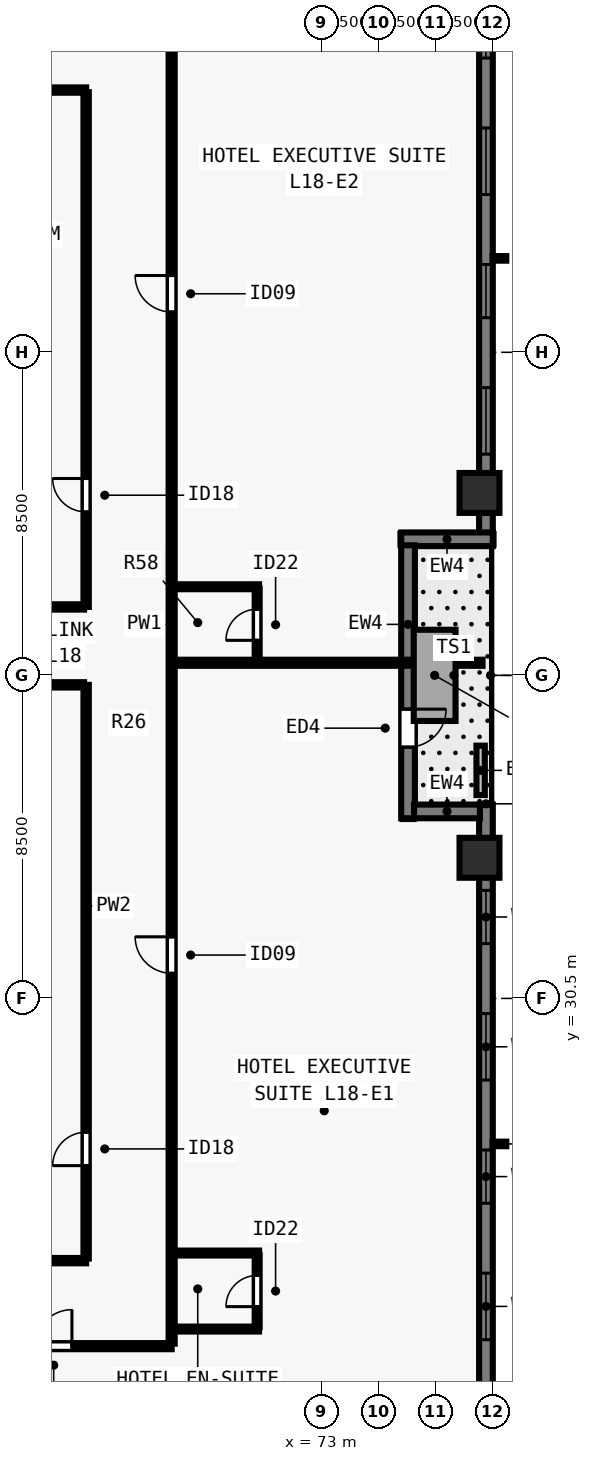
"""IFC4 building model, lengths in metres.
Left out: names, types, materials, properties, quantities, classifications, styles, units other than length and angle.
Written with IfcOpenShell. Run it as: python <this file> out.ifc"""

import sys

from ifc_helpers import new_model, si_unit, direction, frame, frame_2d, origin, origin_2d, place, context, subcontext, project, spatial, rectangle, extrude, element, fill, save


model = new_model("IFC4")
c1 = context("Model", 3, precision=1e-05, world=origin(), true_north=direction((0.0, 1.0)))
c2 = subcontext(c1, "Body", "Model", "MODEL_VIEW")
j1 = project(units=[si_unit("LENGTHUNIT", "METRE"), si_unit("PLANEANGLEUNIT", "RADIAN")], contexts=[c1])
p1 = place(None, origin())
s1 = spatial("IfcSite", under=j1, at=p1, CompositionType="ELEMENT")
p2 = place(p1, origin())
s2 = spatial("IfcBuilding", under=s1, at=p2, CompositionType="ELEMENT")
p3 = place(p2, frame((0.0, 0.0, 69.0)))
s3 = spatial("IfcBuildingStorey", under=s2, at=p3, CompositionType="ELEMENT", Elevation=69.0)
for number, where, z_axis, x_axis in (
    (1, (77.15, 34.2, 0.0), (0.0, 0.0, 1.0), (0.0, 1.0, 0.0)),
    (2, (77.15, 43.8, 0.0), (0.0, 0.0, 1.0), (0.0, 1.0, 0.0)),
):
    element("IfcColumn", number, at=place(p3, frame(where, z_axis=z_axis, x_axis=x_axis)), inside=s3, PredefinedType="COLUMN", context=c2, shape_type="SweptSolid", body=[
        extrude(rectangle(XDim=1.05, YDim=1.05, at=origin_2d()), origin(), (0.0, 0.0, 1.0), 3.5),
    ])
p4 = place(p3, frame((77.32, 35.6, 0.0), z_axis=(0.0, 0.0, 1.0), x_axis=(0.0, -1.0, 0.0)))
e3 = element("IfcWall", 3, at=p4, inside=s3, PredefinedType="SOLIDWALL", context=c2, shape_type="SweptSolid", body=[
    extrude(rectangle(XDim=18.762, YDim=0.36, at=frame_2d((9.381, 0.0))), origin(), (0.0, 0.0, 1.0), 3.28),
])
p5 = place(p4, frame((2.258, 0.0, 0.8)))
e4 = element("IfcOpeningElement", 4, at=p5, cuts=e3, PredefinedType="OPENING", context=c2, shape_type="SweptSolid", body=[
    extrude(rectangle(XDim=1.4, YDim=1.544, at=frame_2d((0.7, 0.772))), frame((0.0, 0.19, 0.0), z_axis=(0.0, -1.0, 0.0), x_axis=(1.0, 0.0, 0.0)), (0.0, 0.0, 1.0), 0.38),
])
p6 = place(p4, frame((5.498, 0.0, 0.8)))
e5 = element("IfcOpeningElement", 5, at=p6, cuts=e3, PredefinedType="OPENING", context=c2, shape_type="SweptSolid", body=[
    extrude(rectangle(XDim=1.75, YDim=1.544, at=frame_2d((0.875, 0.772))), frame((0.0, 0.19, 0.0), z_axis=(0.0, -1.0, 0.0), x_axis=(1.0, 0.0, 0.0)), (0.0, 0.0, 1.0), 0.38),
])
p7 = place(p4, frame((9.089, 0.0, 0.8)))
e6 = element("IfcOpeningElement", 6, at=p7, cuts=e3, PredefinedType="OPENING", context=c2, shape_type="SweptSolid", body=[
    extrude(rectangle(XDim=1.4, YDim=1.544, at=frame_2d((0.7, 0.772))), frame((0.0, 0.19, 0.0), z_axis=(0.0, -1.0, 0.0), x_axis=(1.0, 0.0, 0.0)), (0.0, 0.0, 1.0), 0.38),
])
p8 = place(p4, frame((12.329, 0.0, 0.8)))
e7 = element("IfcOpeningElement", 7, at=p8, cuts=e3, PredefinedType="OPENING", context=c2, shape_type="SweptSolid", body=[
    extrude(rectangle(XDim=1.75, YDim=1.544, at=frame_2d((0.875, 0.772))), frame((0.0, 0.19, 0.0), z_axis=(0.0, -1.0, 0.0), x_axis=(1.0, 0.0, 0.0)), (0.0, 0.0, 1.0), 0.38),
])
p9 = place(p3, frame((77.32, 61.5, 0.0), z_axis=(0.0, 0.0, 1.0), x_axis=(0.0, -1.0, 0.0)))
e8 = element("IfcWall", 8, at=p9, inside=s3, PredefinedType="SOLIDWALL", context=c2, shape_type="SweptSolid", body=[
    extrude(rectangle(XDim=18.762, YDim=0.36, at=frame_2d((9.381, 0.0))), origin(), (0.0, 0.0, 1.0), 3.28),
])
p10 = place(p9, frame((4.858, 0.0, 0.8)))
e9 = element("IfcOpeningElement", 9, at=p10, cuts=e8, PredefinedType="OPENING", context=c2, shape_type="SweptSolid", body=[
    extrude(rectangle(XDim=1.4, YDim=1.544, at=frame_2d((0.7, 0.772))), frame((0.0, 0.19, 0.0), z_axis=(0.0, -1.0, 0.0), x_axis=(1.0, 0.0, 0.0)), (0.0, 0.0, 1.0), 0.38),
])
p11 = place(p9, frame((8.098, 0.0, 0.8)))
e10 = element("IfcOpeningElement", 10, at=p11, cuts=e8, PredefinedType="OPENING", context=c2, shape_type="SweptSolid", body=[
    extrude(rectangle(XDim=1.75, YDim=1.544, at=frame_2d((0.875, 0.772))), frame((0.0, 0.19, 0.0), z_axis=(0.0, -1.0, 0.0), x_axis=(1.0, 0.0, 0.0)), (0.0, 0.0, 1.0), 0.38),
])
p12 = place(p9, frame((11.689, 0.0, 0.8)))
e11 = element("IfcOpeningElement", 11, at=p12, cuts=e8, PredefinedType="OPENING", context=c2, shape_type="SweptSolid", body=[
    extrude(rectangle(XDim=1.4, YDim=1.544, at=frame_2d((0.7, 0.772))), frame((0.0, 0.19, 0.0), z_axis=(0.0, -1.0, 0.0), x_axis=(1.0, 0.0, 0.0)), (0.0, 0.0, 1.0), 0.38),
])
p13 = place(p9, frame((14.929, 0.0, 0.8)))
e12 = element("IfcOpeningElement", 12, at=p13, cuts=e8, PredefinedType="OPENING", context=c2, shape_type="SweptSolid", body=[
    extrude(rectangle(XDim=1.75, YDim=1.544, at=frame_2d((0.875, 0.772))), frame((0.0, 0.19, 0.0), z_axis=(0.0, -1.0, 0.0), x_axis=(1.0, 0.0, 0.0)), (0.0, 0.0, 1.0), 0.38),
])
p14 = place(p3, frame((77.5, 42.58, 0.0), z_axis=(0.0, 0.0, 1.0), x_axis=(-1.0, 0.0, 0.0)))
e13 = element("IfcWall", 13, at=p14, inside=s3, PredefinedType="SOLIDWALL", context=c2, shape_type="SweptSolid", body=[
    extrude(rectangle(XDim=2.41, YDim=0.36, at=frame_2d((1.205, 0.0))), origin(), (0.0, 0.0, 1.0), 3.28),
])
p15 = place(p3, frame((75.27, 42.422, 0.0), z_axis=(0.0, 0.0, 1.0), x_axis=(0.0, -1.0, 0.0)))
e14 = element("IfcWall", 14, at=p15, inside=s3, PredefinedType="SOLIDWALL", context=c2, shape_type="SweptSolid", body=[
    extrude(rectangle(XDim=7.182, YDim=0.36, at=frame_2d((3.591, 0.0))), origin(), (0.0, 0.0, 1.0), 3.28),
])
p16 = place(p15, frame((4.311, 0.0, 0.0)))
e15 = element("IfcOpeningElement", 15, at=p16, cuts=e14, PredefinedType="OPENING", context=c2, shape_type="SweptSolid", body=[
    extrude(rectangle(XDim=1.0, YDim=2.15, at=frame_2d((0.5, 1.075))), frame((0.0, 0.19, 0.0), z_axis=(0.0, -1.0, 0.0), x_axis=(1.0, 0.0, 0.0)), (0.0, 0.0, 1.0), 0.38),
])
p17 = place(p3, frame((75.428, 35.42, 0.0), z_axis=(0.0, 0.0, 1.0), x_axis=(1.0, 0.0, 0.0)))
e16 = element("IfcWall", 16, at=p17, inside=s3, PredefinedType="SOLIDWALL", context=c2, shape_type="SweptSolid", body=[
    extrude(rectangle(XDim=1.734, YDim=0.36, at=frame_2d((0.867, 0.0))), origin(), (0.0, 0.0, 1.0), 3.28),
])
p18 = place(p3, frame((77.18, 35.85, 0.0), z_axis=(0.0, 0.0, 1.0), x_axis=(0.0, 1.0, 0.0)))
e17 = element("IfcWall", 17, at=p18, inside=s3, PredefinedType="PARAPET", context=c2, shape_type="SweptSolid", body=[
    extrude(rectangle(XDim=1.3, YDim=0.22, at=frame_2d((0.65, 0.0))), origin(), (0.0, 0.0, 1.0), 0.55),
])
p19 = place(p3, frame((34.95, 21.35, 0.0), z_axis=(0.0, 0.0, 1.0), x_axis=(1.0, 0.0, 0.0)))
e18 = element("IfcWall", 18, at=p19, inside=s3, PredefinedType="PARTITIONING", context=c2, shape_type="SweptSolid", body=[
    extrude(rectangle(XDim=34.1, YDim=0.16, at=frame_2d((17.05, 0.0))), origin(), (0.0, 0.0, 1.0), 3.28),
])
p20 = place(p19, frame((3.614, 0.0, 0.0)))
e19 = element("IfcOpeningElement", 19, at=p20, cuts=e18, PredefinedType="OPENING", context=c2, shape_type="SweptSolid", body=[
    extrude(rectangle(XDim=0.96, YDim=2.15, at=frame_2d((0.48, 1.075))), frame((0.0, 0.09, 0.0), z_axis=(0.0, -1.0, 0.0), x_axis=(1.0, 0.0, 0.0)), (0.0, 0.0, 1.0), 0.18),
])
p21 = place(p19, frame((17.56, 0.0, 0.0)))
e20 = element("IfcOpeningElement", 20, at=p21, cuts=e18, PredefinedType="OPENING", context=c2, shape_type="SweptSolid", body=[
    extrude(rectangle(XDim=0.96, YDim=2.15, at=frame_2d((0.48, 1.075))), frame((0.0, 0.09, 0.0), z_axis=(0.0, -1.0, 0.0), x_axis=(1.0, 0.0, 0.0)), (0.0, 0.0, 1.0), 0.18),
])
p22 = place(p19, frame((30.516, 0.0, 0.0)))
e21 = element("IfcOpeningElement", 21, at=p22, cuts=e18, PredefinedType="OPENING", context=c2, shape_type="SweptSolid", body=[
    extrude(rectangle(XDim=0.96, YDim=2.15, at=frame_2d((0.48, 1.075))), frame((0.0, 0.09, 0.0), z_axis=(0.0, -1.0, 0.0), x_axis=(1.0, 0.0, 0.0)), (0.0, 0.0, 1.0), 0.18),
])
p23 = place(p3, frame((69.05, 21.415, 0.0), z_axis=(0.0, 0.0, 1.0), x_axis=(0.0, 1.0, 0.0)))
e22 = element("IfcWall", 22, at=p23, inside=s3, PredefinedType="PARTITIONING", context=c2, shape_type="SweptSolid", body=[
    extrude(rectangle(XDim=35.17, YDim=0.16, at=frame_2d((17.585, 0.0))), origin(), (0.0, 0.0, 1.0), 3.28),
])
p24 = place(p23, frame((9.746, 0.0, 0.0)))
e23 = element("IfcOpeningElement", 23, at=p24, cuts=e22, PredefinedType="OPENING", context=c2, shape_type="SweptSolid", body=[
    extrude(rectangle(XDim=0.96, YDim=2.15, at=frame_2d((0.48, 1.075))), frame((0.0, 0.09, 0.0), z_axis=(0.0, -1.0, 0.0), x_axis=(1.0, 0.0, 0.0)), (0.0, 0.0, 1.0), 0.18),
])
p25 = place(p23, frame((27.146, 0.0, 0.0)))
e24 = element("IfcOpeningElement", 24, at=p25, cuts=e22, PredefinedType="OPENING", context=c2, shape_type="SweptSolid", body=[
    extrude(rectangle(XDim=0.96, YDim=2.15, at=frame_2d((0.48, 1.075))), frame((0.0, 0.09, 0.0), z_axis=(0.0, -1.0, 0.0), x_axis=(1.0, 0.0, 0.0)), (0.0, 0.0, 1.0), 0.18),
])
p26 = place(p3, frame((37.2, 23.6, 0.0), z_axis=(0.0, 0.0, 1.0), x_axis=(1.0, 0.0, 0.0)))
e25 = element("IfcWall", 25, at=p26, inside=s3, PredefinedType="PARTITIONING", context=c2, shape_type="SweptSolid", body=[
    extrude(rectangle(XDim=29.6, YDim=0.14, at=frame_2d((14.8, 0.0))), origin(), (0.0, 0.0, 1.0), 3.28),
])
p27 = place(p26, frame((1.2, 0.0, 0.0)))
e26 = element("IfcOpeningElement", 26, at=p27, cuts=e25, PredefinedType="OPENING", context=c2, shape_type="SweptSolid", body=[
    extrude(rectangle(XDim=0.88, YDim=2.1, at=frame_2d((0.44, 1.05))), frame((0.0, 0.08, 0.0), z_axis=(0.0, -1.0, 0.0), x_axis=(1.0, 0.0, 0.0)), (0.0, 0.0, 1.0), 0.16),
])
p28 = place(p26, frame((11.3, 0.0, 0.0)))
e27 = element("IfcOpeningElement", 27, at=p28, cuts=e25, PredefinedType="OPENING", context=c2, shape_type="SweptSolid", body=[
    extrude(rectangle(XDim=0.88, YDim=2.1, at=frame_2d((0.44, 1.05))), frame((0.0, 0.08, 0.0), z_axis=(0.0, -1.0, 0.0), x_axis=(1.0, 0.0, 0.0)), (0.0, 0.0, 1.0), 0.16),
])
p29 = place(p26, frame((21.8, 0.0, 0.0)))
e28 = element("IfcOpeningElement", 28, at=p29, cuts=e25, PredefinedType="OPENING", context=c2, shape_type="SweptSolid", body=[
    extrude(rectangle(XDim=0.88, YDim=2.1, at=frame_2d((0.44, 1.05))), frame((0.0, 0.08, 0.0), z_axis=(0.0, -1.0, 0.0), x_axis=(1.0, 0.0, 0.0)), (0.0, 0.0, 1.0), 0.16),
])
p30 = place(p3, frame((37.2, 54.4, 0.0), z_axis=(0.0, 0.0, 1.0), x_axis=(1.0, 0.0, 0.0)))
e29 = element("IfcWall", 29, at=p30, inside=s3, PredefinedType="PARTITIONING", context=c2, shape_type="SweptSolid", body=[
    extrude(rectangle(XDim=29.6, YDim=0.14, at=frame_2d((14.8, 0.0))), origin(), (0.0, 0.0, 1.0), 3.28),
])
p31 = place(p30, frame((2.2, 0.0, 0.0)))
e30 = element("IfcOpeningElement", 30, at=p31, cuts=e29, PredefinedType="OPENING", context=c2, shape_type="SweptSolid", body=[
    extrude(rectangle(XDim=0.88, YDim=2.1, at=frame_2d((0.44, 1.05))), frame((0.0, 0.08, 0.0), z_axis=(0.0, -1.0, 0.0), x_axis=(1.0, 0.0, 0.0)), (0.0, 0.0, 1.0), 0.16),
])
p32 = place(p30, frame((15.3, 0.0, 0.0)))
e31 = element("IfcOpeningElement", 31, at=p32, cuts=e29, PredefinedType="OPENING", context=c2, shape_type="SweptSolid", body=[
    extrude(rectangle(XDim=0.88, YDim=2.1, at=frame_2d((0.44, 1.05))), frame((0.0, 0.08, 0.0), z_axis=(0.0, -1.0, 0.0), x_axis=(1.0, 0.0, 0.0)), (0.0, 0.0, 1.0), 0.16),
])
p33 = place(p30, frame((24.8, 0.0, 0.0)))
e32 = element("IfcOpeningElement", 32, at=p33, cuts=e29, PredefinedType="OPENING", context=c2, shape_type="SweptSolid", body=[
    extrude(rectangle(XDim=0.88, YDim=2.1, at=frame_2d((0.44, 1.05))), frame((0.0, 0.08, 0.0), z_axis=(0.0, -1.0, 0.0), x_axis=(1.0, 0.0, 0.0)), (0.0, 0.0, 1.0), 0.16),
])
p34 = place(p3, frame((66.8, 23.655, 0.0), z_axis=(0.0, 0.0, 1.0), x_axis=(0.0, 1.0, 0.0)))
e33 = element("IfcWall", 33, at=p34, inside=s3, PredefinedType="PARTITIONING", context=c2, shape_type="SweptSolid", body=[
    extrude(rectangle(XDim=15.095, YDim=0.14, at=frame_2d((7.547, 0.0))), origin(), (0.0, 0.0, 1.0), 3.28),
])
p35 = place(p34, frame((2.445, 0.0, 0.0)))
e34 = element("IfcOpeningElement", 34, at=p35, cuts=e33, PredefinedType="OPENING", context=c2, shape_type="SweptSolid", body=[
    extrude(rectangle(XDim=0.88, YDim=2.1, at=frame_2d((0.44, 1.05))), frame((0.0, 0.08, 0.0), z_axis=(0.0, -1.0, 0.0), x_axis=(1.0, 0.0, 0.0)), (0.0, 0.0, 1.0), 0.16),
])
p36 = place(p3, frame((66.8, 40.8, 0.0), z_axis=(0.0, 0.0, 1.0), x_axis=(0.0, 1.0, 0.0)))
e35 = element("IfcWall", 35, at=p36, inside=s3, PredefinedType="PARTITIONING", context=c2, shape_type="SweptSolid", body=[
    extrude(rectangle(XDim=13.545, YDim=0.14, at=frame_2d((6.772, 0.0))), origin(), (0.0, 0.0, 1.0), 3.28),
])
p37 = place(p36, frame((2.5, 0.0, 0.0)))
e36 = element("IfcOpeningElement", 36, at=p37, cuts=e35, PredefinedType="OPENING", context=c2, shape_type="SweptSolid", body=[
    extrude(rectangle(XDim=0.88, YDim=2.1, at=frame_2d((0.44, 1.05))), frame((0.0, 0.08, 0.0), z_axis=(0.0, -1.0, 0.0), x_axis=(1.0, 0.0, 0.0)), (0.0, 0.0, 1.0), 0.16),
])
for number, where, z_axis, x_axis in (
    (37, (60.76, 38.75, 0.0), (0.0, 0.0, 1.0), (1.0, 0.0, 0.0)),
    (38, (60.76, 40.8, 0.0), (0.0, 0.0, 1.0), (1.0, 0.0, 0.0)),
):
    element("IfcWall", number, at=place(p3, frame(where, z_axis=z_axis, x_axis=x_axis)), inside=s3, PredefinedType="PARTITIONING", context=c2, shape_type="SweptSolid", body=[
        extrude(rectangle(XDim=5.985, YDim=0.14, at=frame_2d((2.993, 0.0))), origin(), (0.0, 0.0, 1.0), 3.28),
    ])
p38 = place(p3, frame((69.115, 21.8, 0.0), z_axis=(0.0, 0.0, 1.0), x_axis=(1.0, 0.0, 0.0)))
e39 = element("IfcWall", 39, at=p38, inside=s3, PredefinedType="PLUMBINGWALL", context=c2, shape_type="SweptSolid", body=[
    extrude(rectangle(XDim=2.235, YDim=0.13, at=frame_2d((1.118, 0.0))), origin(), (0.0, 0.0, 1.0), 2.849),
])
p39 = place(p3, frame((69.115, 23.8, 0.0), z_axis=(0.0, 0.0, 1.0), x_axis=(1.0, 0.0, 0.0)))
e40 = element("IfcWall", 40, at=p39, inside=s3, PredefinedType="PLUMBINGWALL", context=c2, shape_type="SweptSolid", body=[
    extrude(rectangle(XDim=2.235, YDim=0.13, at=frame_2d((1.118, 0.0))), origin(), (0.0, 0.0, 1.0), 3.28),
])
p40 = place(p3, frame((71.3, 21.85, 0.0), z_axis=(0.0, 0.0, 1.0), x_axis=(0.0, 1.0, 0.0)))
e41 = element("IfcWall", 41, at=p40, inside=s3, PredefinedType="PLUMBINGWALL", context=c2, shape_type="SweptSolid", body=[
    extrude(rectangle(XDim=1.9, YDim=0.13, at=frame_2d((0.95, 0.0))), origin(), (0.0, 0.0, 1.0), 3.28),
])
p41 = place(p40, frame((0.54, 0.0, 0.0)))
e42 = element("IfcOpeningElement", 42, at=p41, cuts=e41, PredefinedType="OPENING", context=c2, shape_type="SweptSolid", body=[
    extrude(rectangle(XDim=0.82, YDim=2.1, at=frame_2d((0.41, 1.05))), frame((0.0, 0.075, 0.0), z_axis=(0.0, -1.0, 0.0), x_axis=(1.0, 0.0, 0.0)), (0.0, 0.0, 1.0), 0.15),
])
p42 = place(p3, frame((69.115, 39.332, 0.0), z_axis=(0.0, 0.0, 1.0), x_axis=(1.0, 0.0, 0.0)))
e43 = element("IfcWall", 43, at=p42, inside=s3, PredefinedType="PARTITIONING", context=c2, shape_type="SweptSolid", body=[
    extrude(rectangle(XDim=8.115, YDim=0.16, at=frame_2d((4.058, 0.0))), origin(), (0.0, 0.0, 1.0), 3.28),
])
p43 = place(p3, frame((69.115, 41.332, 0.0), z_axis=(0.0, 0.0, 1.0), x_axis=(1.0, 0.0, 0.0)))
e44 = element("IfcWall", 44, at=p43, inside=s3, PredefinedType="PLUMBINGWALL", context=c2, shape_type="SweptSolid", body=[
    extrude(rectangle(XDim=2.235, YDim=0.13, at=frame_2d((1.118, 0.0))), origin(), (0.0, 0.0, 1.0), 3.28),
])
p44 = place(p3, frame((71.3, 39.396, 0.0), z_axis=(0.0, 0.0, 1.0), x_axis=(0.0, 1.0, 0.0)))
e45 = element("IfcWall", 45, at=p44, inside=s3, PredefinedType="PLUMBINGWALL", context=c2, shape_type="SweptSolid", body=[
    extrude(rectangle(XDim=1.885, YDim=0.13, at=frame_2d((0.942, 0.0))), origin(), (0.0, 0.0, 1.0), 3.28),
])
p45 = place(p44, frame((0.525, 0.0, 0.0)))
e46 = element("IfcOpeningElement", 46, at=p45, cuts=e45, PredefinedType="OPENING", context=c2, shape_type="SweptSolid", body=[
    extrude(rectangle(XDim=0.82, YDim=2.1, at=frame_2d((0.41, 1.05))), frame((0.0, 0.075, 0.0), z_axis=(0.0, -1.0, 0.0), x_axis=(1.0, 0.0, 0.0)), (0.0, 0.0, 1.0), 0.15),
])
p46 = place(p5, origin())
e47 = element("IfcWindow", 47, at=p46, inside=s3, PartitioningType="SINGLE_PANEL", PredefinedType="WINDOW", context=c2, shape_type="SweptSolid", body=[
    extrude(rectangle(XDim=1.4, YDim=1.544, at=frame_2d((0.7, 0.772))), frame((0.0, -0.05, 0.0), z_axis=(0.0, -1.0, 0.0), x_axis=(1.0, 0.0, 0.0)), (0.0, 0.0, 1.0), 0.06),
])
fill(e4, e47)
p47 = place(p6, origin())
e48 = element("IfcWindow", 48, at=p47, inside=s3, PartitioningType="SINGLE_PANEL", PredefinedType="WINDOW", context=c2, shape_type="SweptSolid", body=[
    extrude(rectangle(XDim=1.75, YDim=1.544, at=frame_2d((0.875, 0.772))), frame((0.0, -0.05, 0.0), z_axis=(0.0, -1.0, 0.0), x_axis=(1.0, 0.0, 0.0)), (0.0, 0.0, 1.0), 0.06),
])
fill(e5, e48)
p48 = place(p7, origin())
e49 = element("IfcWindow", 49, at=p48, inside=s3, PartitioningType="SINGLE_PANEL", PredefinedType="WINDOW", context=c2, shape_type="SweptSolid", body=[
    extrude(rectangle(XDim=1.4, YDim=1.544, at=frame_2d((0.7, 0.772))), frame((0.0, -0.05, 0.0), z_axis=(0.0, -1.0, 0.0), x_axis=(1.0, 0.0, 0.0)), (0.0, 0.0, 1.0), 0.06),
])
fill(e6, e49)
p49 = place(p8, origin())
e50 = element("IfcWindow", 50, at=p49, inside=s3, PartitioningType="SINGLE_PANEL", PredefinedType="WINDOW", context=c2, shape_type="SweptSolid", body=[
    extrude(rectangle(XDim=1.75, YDim=1.544, at=frame_2d((0.875, 0.772))), frame((0.0, -0.05, 0.0), z_axis=(0.0, -1.0, 0.0), x_axis=(1.0, 0.0, 0.0)), (0.0, 0.0, 1.0), 0.06),
])
fill(e7, e50)
p50 = place(p10, origin())
e51 = element("IfcWindow", 51, at=p50, inside=s3, PartitioningType="SINGLE_PANEL", PredefinedType="WINDOW", context=c2, shape_type="SweptSolid", body=[
    extrude(rectangle(XDim=1.4, YDim=1.544, at=frame_2d((0.7, 0.772))), frame((0.0, -0.05, 0.0), z_axis=(0.0, -1.0, 0.0), x_axis=(1.0, 0.0, 0.0)), (0.0, 0.0, 1.0), 0.06),
])
fill(e9, e51)
p51 = place(p11, origin())
e52 = element("IfcWindow", 52, at=p51, inside=s3, PartitioningType="SINGLE_PANEL", PredefinedType="WINDOW", context=c2, shape_type="SweptSolid", body=[
    extrude(rectangle(XDim=1.75, YDim=1.544, at=frame_2d((0.875, 0.772))), frame((0.0, -0.05, 0.0), z_axis=(0.0, -1.0, 0.0), x_axis=(1.0, 0.0, 0.0)), (0.0, 0.0, 1.0), 0.06),
])
fill(e10, e52)
p52 = place(p12, origin())
e53 = element("IfcWindow", 53, at=p52, inside=s3, PartitioningType="SINGLE_PANEL", PredefinedType="WINDOW", context=c2, shape_type="SweptSolid", body=[
    extrude(rectangle(XDim=1.4, YDim=1.544, at=frame_2d((0.7, 0.772))), frame((0.0, -0.05, 0.0), z_axis=(0.0, -1.0, 0.0), x_axis=(1.0, 0.0, 0.0)), (0.0, 0.0, 1.0), 0.06),
])
fill(e11, e53)
p53 = place(p13, origin())
e54 = element("IfcWindow", 54, at=p53, inside=s3, PartitioningType="SINGLE_PANEL", PredefinedType="WINDOW", context=c2, shape_type="SweptSolid", body=[
    extrude(rectangle(XDim=1.75, YDim=1.544, at=frame_2d((0.875, 0.772))), frame((0.0, -0.05, 0.0), z_axis=(0.0, -1.0, 0.0), x_axis=(1.0, 0.0, 0.0)), (0.0, 0.0, 1.0), 0.06),
])
fill(e12, e54)
p54 = place(p16, origin())
e55 = element("IfcDoor", 55, at=p54, inside=s3, OperationType="SINGLE_SWING_LEFT", PredefinedType="DOOR", context=c2, shape_type="SweptSolid", body=[
    extrude(rectangle(XDim=1.0, YDim=2.15, at=frame_2d((0.5, 1.075))), frame((0.0, 0.025, 0.0), z_axis=(0.0, -1.0, 0.0), x_axis=(1.0, 0.0, 0.0)), (0.0, 0.0, 1.0), 0.05),
])
fill(e15, e55)
p55 = place(p35, origin())
e56 = element("IfcDoor", 56, at=p55, inside=s3, OperationType="SINGLE_SWING_LEFT", PredefinedType="DOOR", context=c2, shape_type="SweptSolid", body=[
    extrude(rectangle(XDim=0.88, YDim=2.1, at=frame_2d((0.44, 1.05))), frame((0.0, 0.025, 0.0), z_axis=(0.0, -1.0, 0.0), x_axis=(1.0, 0.0, 0.0)), (0.0, 0.0, 1.0), 0.05),
])
fill(e34, e56)
p56 = place(p37, origin())
e57 = element("IfcDoor", 57, at=p56, inside=s3, OperationType="SINGLE_SWING_RIGHT", PredefinedType="DOOR", context=c2, shape_type="SweptSolid", body=[
    extrude(rectangle(XDim=0.88, YDim=2.1, at=frame_2d((0.44, 1.05))), frame((0.0, 0.025, 0.0), z_axis=(0.0, -1.0, 0.0), x_axis=(1.0, 0.0, 0.0)), (0.0, 0.0, 1.0), 0.05),
])
fill(e36, e57)
p57 = place(p22, origin())
e58 = element("IfcDoor", 58, at=p57, inside=s3, OperationType="SINGLE_SWING_RIGHT", PredefinedType="DOOR", context=c2, shape_type="SweptSolid", body=[
    extrude(rectangle(XDim=0.96, YDim=2.15, at=frame_2d((0.48, 1.075))), frame((0.0, 0.025, 0.0), z_axis=(0.0, -1.0, 0.0), x_axis=(1.0, 0.0, 0.0)), (0.0, 0.0, 1.0), 0.05),
])
fill(e21, e58)
p58 = place(p41, origin())
e59 = element("IfcDoor", 59, at=p58, inside=s3, OperationType="SINGLE_SWING_LEFT", PredefinedType="DOOR", context=c2, shape_type="SweptSolid", body=[
    extrude(rectangle(XDim=0.82, YDim=2.1, at=frame_2d((0.41, 1.05))), frame((0.0, 0.025, 0.0), z_axis=(0.0, -1.0, 0.0), x_axis=(1.0, 0.0, 0.0)), (0.0, 0.0, 1.0), 0.05),
])
fill(e42, e59)
p59 = place(p24, origin())
e60 = element("IfcDoor", 60, at=p59, inside=s3, OperationType="SINGLE_SWING_RIGHT", PredefinedType="DOOR", context=c2, shape_type="SweptSolid", body=[
    extrude(rectangle(XDim=0.96, YDim=2.15, at=frame_2d((0.48, 1.075))), frame((0.0, 0.025, 0.0), z_axis=(0.0, -1.0, 0.0), x_axis=(1.0, 0.0, 0.0)), (0.0, 0.0, 1.0), 0.05),
])
fill(e23, e60)
p60 = place(p45, origin())
e61 = element("IfcDoor", 61, at=p60, inside=s3, OperationType="SINGLE_SWING_LEFT", PredefinedType="DOOR", context=c2, shape_type="SweptSolid", body=[
    extrude(rectangle(XDim=0.82, YDim=2.1, at=frame_2d((0.41, 1.05))), frame((0.0, 0.025, 0.0), z_axis=(0.0, -1.0, 0.0), x_axis=(1.0, 0.0, 0.0)), (0.0, 0.0, 1.0), 0.05),
])
fill(e46, e61)
p61 = place(p25, origin())
e62 = element("IfcDoor", 62, at=p61, inside=s3, OperationType="SINGLE_SWING_RIGHT", PredefinedType="DOOR", context=c2, shape_type="SweptSolid", body=[
    extrude(rectangle(XDim=0.96, YDim=2.15, at=frame_2d((0.48, 1.075))), frame((0.0, 0.025, 0.0), z_axis=(0.0, -1.0, 0.0), x_axis=(1.0, 0.0, 0.0)), (0.0, 0.0, 1.0), 0.05),
])
fill(e24, e62)
save(model, sys.argv[1])
